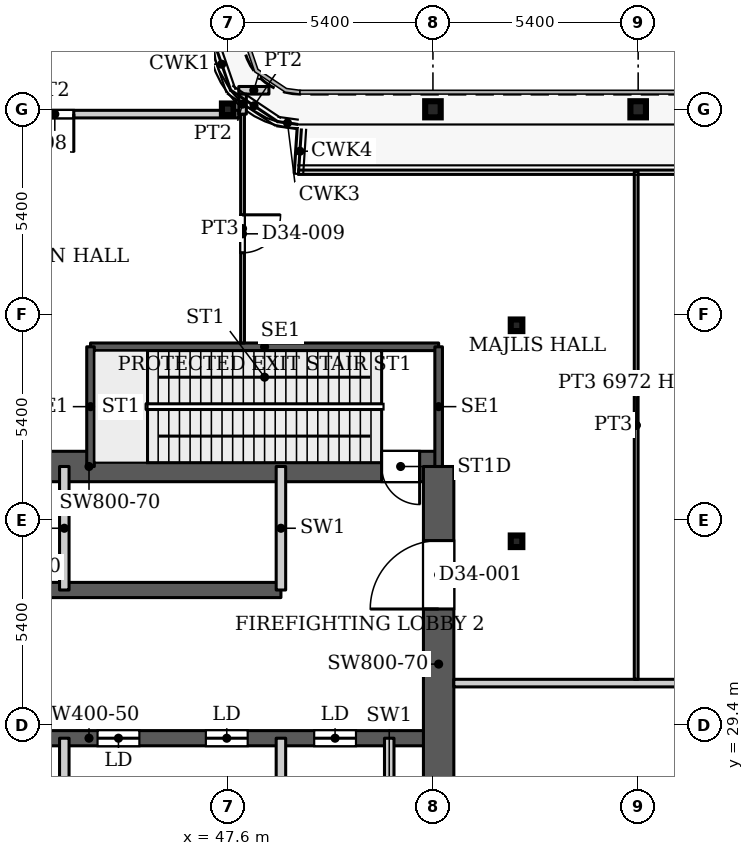
"""IFC4 building model, lengths in metres.
Left out: names, types, materials, properties, quantities, classifications, styles, units other than length and angle.
Written with IfcOpenShell. Run it as: python <this file> out.ifc"""

import sys

from ifc_helpers import new_model, si_unit, direction, frame, frame_2d, origin, origin_2d, place, context, subcontext, project, spatial, rectangle, hollow_rectangle, i_section, extrude, source, transform, mapped, element, fill, save


model = new_model("IFC4")
c1 = context("Model", 3, precision=1e-05, world=origin(), true_north=direction((0.0, 1.0)))
c2 = subcontext(c1, "Body", "Model", "MODEL_VIEW")
j1 = project(units=[si_unit("LENGTHUNIT", "METRE"), si_unit("PLANEANGLEUNIT", "RADIAN")], contexts=[c1])
p1 = place(None, origin())
s1 = spatial("IfcSite", under=j1, at=p1, CompositionType="ELEMENT")
p2 = place(p1, origin())
s2 = spatial("IfcBuilding", under=s1, at=p2, CompositionType="ELEMENT")
p3 = place(p2, frame((0.0, 0.0, 144.8)))
s3 = spatial("IfcBuildingStorey", under=s2, at=p3, CompositionType="ELEMENT", Elevation=144.8)
for number, where, z_axis, x_axis in (
    (1, (53.0, 45.6, 0.0), (0.0, 0.0, 1.0), (1.0, 0.0, 0.0)),
    (2, (58.4, 45.6, 0.0), (0.0, 0.0, 1.0), (1.0, 0.0, 0.0)),
):
    element("IfcColumn", number, at=place(p3, frame(where, z_axis=z_axis, x_axis=x_axis)), inside=s3, PredefinedType="COLUMN", context=c2, shape_type="SweptSolid", body=[
        extrude(i_section(OverallWidth=0.409, OverallDepth=0.425, WebThickness=0.033, FlangeThickness=0.052, FilletRadius=0.013, at=origin_2d()), origin(), (0.0, 0.0, 1.0), 7.8),
    ])
for number, where, z_axis, x_axis in (
    (3, (55.2, 34.232, 0.0), (0.0, 0.0, 1.0), (1.0, 0.0, 0.0)),
    (4, (55.2, 39.916, 0.0), (0.0, 0.0, 1.0), (1.0, 0.0, 0.0)),
    (5, (47.6, 45.6, 0.0), (0.0, 0.0, 1.0), (1.0, 0.0, 0.0)),
):
    element("IfcColumn", number, at=place(p3, frame(where, z_axis=z_axis, x_axis=x_axis)), inside=s3, PredefinedType="COLUMN", context=c2, shape_type="SweptSolid", body=[
        extrude(hollow_rectangle(XDim=0.305, YDim=0.305, WallThickness=0.016, InnerFilletRadius=0.016, OuterFilletRadius=0.032, at=origin_2d()), origin(), (0.0, 0.0, 1.0), 7.8),
    ])
p4 = place(p3, frame((34.75, 29.05, 0.0), z_axis=(0.0, 0.0, 1.0), x_axis=(1.0, 0.0, 0.0)))
e6 = element("IfcWall", 6, at=p4, inside=s3, PredefinedType="SHEAR", context=c2, shape_type="SweptSolid", body=[
    extrude(rectangle(XDim=18.4, YDim=0.4, at=frame_2d((9.2, 0.0))), origin(), (0.0, 0.0, 1.0), 7.8),
])
p5 = place(p4, frame((0.875, 0.0, 0.0)))
e7 = element("IfcOpeningElement", 7, at=p5, cuts=e6, PredefinedType="OPENING", context=c2, shape_type="SweptSolid", body=[
    extrude(rectangle(XDim=1.1, YDim=2.2, at=frame_2d((0.55, 1.1))), frame((0.0, 0.21, 0.0), z_axis=(0.0, -1.0, 0.0), x_axis=(1.0, 0.0, 0.0)), (0.0, 0.0, 1.0), 0.42),
])
p6 = place(p4, frame((3.725, 0.0, 0.0)))
e8 = element("IfcOpeningElement", 8, at=p6, cuts=e6, PredefinedType="OPENING", context=c2, shape_type="SweptSolid", body=[
    extrude(rectangle(XDim=1.1, YDim=2.2, at=frame_2d((0.55, 1.1))), frame((0.0, 0.21, 0.0), z_axis=(0.0, -1.0, 0.0), x_axis=(1.0, 0.0, 0.0)), (0.0, 0.0, 1.0), 0.42),
])
p7 = place(p4, frame((6.575, 0.0, 0.0)))
e9 = element("IfcOpeningElement", 9, at=p7, cuts=e6, PredefinedType="OPENING", context=c2, shape_type="SweptSolid", body=[
    extrude(rectangle(XDim=1.1, YDim=2.2, at=frame_2d((0.55, 1.1))), frame((0.0, 0.21, 0.0), z_axis=(0.0, -1.0, 0.0), x_axis=(1.0, 0.0, 0.0)), (0.0, 0.0, 1.0), 0.42),
])
p8 = place(p4, frame((9.425, 0.0, 0.0)))
e10 = element("IfcOpeningElement", 10, at=p8, cuts=e6, PredefinedType="OPENING", context=c2, shape_type="SweptSolid", body=[
    extrude(rectangle(XDim=1.1, YDim=2.2, at=frame_2d((0.55, 1.1))), frame((0.0, 0.21, 0.0), z_axis=(0.0, -1.0, 0.0), x_axis=(1.0, 0.0, 0.0)), (0.0, 0.0, 1.0), 0.42),
])
p9 = place(p4, frame((12.275, 0.0, 0.0)))
e11 = element("IfcOpeningElement", 11, at=p9, cuts=e6, PredefinedType="OPENING", context=c2, shape_type="SweptSolid", body=[
    extrude(rectangle(XDim=1.1, YDim=2.2, at=frame_2d((0.55, 1.1))), frame((0.0, 0.21, 0.0), z_axis=(0.0, -1.0, 0.0), x_axis=(1.0, 0.0, 0.0)), (0.0, 0.0, 1.0), 0.42),
])
p10 = place(p4, frame((15.125, 0.0, 0.0)))
e12 = element("IfcOpeningElement", 12, at=p10, cuts=e6, PredefinedType="OPENING", context=c2, shape_type="SweptSolid", body=[
    extrude(rectangle(XDim=1.1, YDim=2.2, at=frame_2d((0.55, 1.1))), frame((0.0, 0.21, 0.0), z_axis=(0.0, -1.0, 0.0), x_axis=(1.0, 0.0, 0.0)), (0.0, 0.0, 1.0), 0.42),
])
p11 = place(p3, frame((34.75, 32.95, 0.0), z_axis=(0.0, 0.0, 1.0), x_axis=(1.0, 0.0, 0.0)))
e13 = element("IfcWall", 13, at=p11, inside=s3, PredefinedType="SHEAR", context=c2, shape_type="SweptSolid", body=[
    extrude(rectangle(XDim=14.25, YDim=0.4, at=frame_2d((7.125, 0.0))), origin(), (0.0, 0.0, 1.0), 7.8),
])
p12 = place(p3, frame((34.75, 36.2, 0.0), z_axis=(0.0, 0.0, 1.0), x_axis=(1.0, 0.0, 0.0)))
e14 = element("IfcWall", 14, at=p12, inside=s3, PredefinedType="SHEAR", context=c2, shape_type="SweptSolid", body=[
    extrude(rectangle(XDim=18.4, YDim=0.8, at=frame_2d((9.2, 0.0))), origin(), (0.0, 0.0, 1.0), 7.8),
])
p13 = place(p12, frame((16.9, 0.0, 0.0)))
e15 = element("IfcOpeningElement", 15, at=p13, cuts=e14, PredefinedType="OPENING", context=c2, shape_type="SweptSolid", body=[
    extrude(rectangle(XDim=1.0, YDim=2.2, at=frame_2d((0.5, 1.1))), frame((0.0, 0.41, 0.0), z_axis=(0.0, -1.0, 0.0), x_axis=(1.0, 0.0, 0.0)), (0.0, 0.0, 1.0), 0.82),
])
p14 = place(p3, frame((53.15, 25.8, 0.0), z_axis=(0.0, 0.0, 1.0), x_axis=(0.0, 1.0, 0.0)))
e16 = element("IfcWall", 16, at=p14, inside=s3, PredefinedType="SHEAR", context=c2, shape_type="SweptSolid", body=[
    extrude(rectangle(XDim=10.4, YDim=0.8, at=frame_2d((5.2, 0.0))), origin(), (0.0, 0.0, 1.0), 7.8),
])
p15 = place(p14, frame((6.65, 0.0, 0.0)))
e17 = element("IfcOpeningElement", 17, at=p15, cuts=e16, PredefinedType="OPENING", context=c2, shape_type="SweptSolid", body=[
    extrude(rectangle(XDim=1.8, YDim=2.1, at=frame_2d((0.9, 1.05))), frame((0.0, 0.41, 0.0), z_axis=(0.0, -1.0, 0.0), x_axis=(1.0, 0.0, 0.0)), (0.0, 0.0, 1.0), 0.82),
])
p16 = place(p3, frame((43.99, 39.35, 0.0), z_axis=(0.0, 0.0, 1.0), x_axis=(1.0, 0.0, 0.0)))
e18 = element("IfcWall", 18, at=p16, inside=s3, PredefinedType="SHEAR", context=c2, shape_type="SweptSolid", body=[
    extrude(rectangle(XDim=9.16, YDim=0.2, at=frame_2d((4.58, 0.0))), origin(), (0.0, 0.0, 1.0), 7.8),
])
for number, where, z_axis, x_axis in (
    (19, (43.99, 36.2, 0.0), (0.0, 0.0, 1.0), (0.0, 1.0, 0.0)),
    (20, (53.15, 36.2, 0.0), (0.0, 0.0, 1.0), (0.0, 1.0, 0.0)),
):
    element("IfcWall", number, at=place(p3, frame(where, z_axis=z_axis, x_axis=x_axis)), inside=s3, PredefinedType="SHEAR", context=c2, shape_type="SweptSolid", body=[
        extrude(rectangle(XDim=3.15, YDim=0.2, at=frame_2d((1.575, 0.0))), origin(), (0.0, 0.0, 1.0), 7.8),
    ])
for number, where, z_axis, x_axis in (
    (21, (43.3, 25.8, 0.0), (0.0, 0.0, 1.0), (0.0, 1.0, 0.0)),
    (22, (43.3, 32.95, 0.0), (0.0, 0.0, 1.0), (0.0, 1.0, 0.0)),
    (23, (49.0, 25.8, 0.0), (0.0, 0.0, 1.0), (0.0, 1.0, 0.0)),
    (24, (49.0, 32.95, 0.0), (0.0, 0.0, 1.0), (0.0, 1.0, 0.0)),
    (25, (51.85, 25.8, 0.0), (0.0, 0.0, 1.0), (0.0, 1.0, 0.0)),
):
    element("IfcWall", number, at=place(p3, frame(where, z_axis=z_axis, x_axis=x_axis)), inside=s3, PredefinedType="PARTITIONING", context=c2, shape_type="SweptSolid", body=[
        extrude(rectangle(XDim=3.25, YDim=0.25, at=frame_2d((1.625, 0.0))), origin(), (0.0, 0.0, 1.0), 7.8),
    ])
p17 = place(p3, frame((37.999, 45.473, 0.0), z_axis=(0.0, 0.0, 1.0), x_axis=(1.0, 0.0, 0.0)))
e26 = element("IfcWall", 26, at=p17, inside=s3, PredefinedType="PARTITIONING", context=c2, shape_type="SweptSolid", body=[
    extrude(rectangle(XDim=9.891, YDim=0.2, at=frame_2d((4.945, 0.0))), origin(), (0.0, 0.0, 1.0), 7.5),
])
p18 = place(p17, frame((4.551, 0.0, 0.0)))
e27 = element("IfcOpeningElement", 27, at=p18, cuts=e26, PredefinedType="OPENING", context=c2, shape_type="SweptSolid", body=[
    extrude(rectangle(XDim=1.0, YDim=2.1, at=frame_2d((0.5, 1.05))), frame((0.0, 0.11, 0.0), z_axis=(0.0, -1.0, 0.0), x_axis=(1.0, 0.0, 0.0)), (0.0, 0.0, 1.0), 0.22),
])
p19 = place(p3, frame((47.89, 46.1, 0.0), z_axis=(0.0, 0.0, 1.0), x_axis=(1.0, 0.0, 0.0)))
e28 = element("IfcWall", 28, at=p19, inside=s3, PredefinedType="PARTITIONING", context=c2, shape_type="SweptSolid", body=[
    extrude(rectangle(XDim=0.794, YDim=0.2, at=frame_2d((0.397, 0.0))), origin(), (0.0, 0.0, 1.0), 7.5),
])
p20 = place(p3, frame((47.99, 39.449, 0.0), z_axis=(0.0, 0.0, 1.0), x_axis=(0.0, 1.0, 0.0)))
e29 = element("IfcWall", 29, at=p20, inside=s3, PredefinedType="PARTITIONING", context=c2, shape_type="SweptSolid", body=[
    extrude(rectangle(XDim=6.024, YDim=0.1, at=frame_2d((3.012, 0.0))), origin(), (0.0, 0.0, 1.0), 7.5),
])
p21 = place(p20, frame((2.374, 0.0, 0.0)))
e30 = element("IfcOpeningElement", 30, at=p21, cuts=e29, PredefinedType="OPENING", context=c2, shape_type="SweptSolid", body=[
    extrude(rectangle(XDim=1.0, YDim=2.1, at=frame_2d((0.5, 1.05))), frame((0.0, 0.06, 0.0), z_axis=(0.0, -1.0, 0.0), x_axis=(1.0, 0.0, 0.0)), (0.0, 0.0, 1.0), 0.12),
])
p22 = place(p3, frame((47.99, 45.473, 0.0), z_axis=(0.0, 0.0, 1.0), x_axis=(0.0, 1.0, 0.0)))
e31 = element("IfcWall", 31, at=p22, inside=s3, PredefinedType="PARTITIONING", context=c2, shape_type="SweptSolid", body=[
    extrude(rectangle(XDim=0.527, YDim=0.2, at=frame_2d((0.264, 0.0))), origin(), (0.0, 0.0, 1.0), 7.5),
])
p23 = place(p3, frame((53.549, 30.5, 0.0), z_axis=(0.0, 0.0, 1.0), x_axis=(1.0, 0.0, 0.0)))
e32 = element("IfcWall", 32, at=p23, inside=s3, PredefinedType="PARTITIONING", context=c2, shape_type="SweptSolid", body=[
    extrude(rectangle(XDim=15.207, YDim=0.2, at=frame_2d((7.604, 0.0))), origin(), (0.0, 0.0, 1.0), 7.5),
])
p24 = place(p23, frame((9.083, 0.0, 0.0)))
e33 = element("IfcOpeningElement", 33, at=p24, cuts=e32, PredefinedType="OPENING", context=c2, shape_type="SweptSolid", body=[
    extrude(rectangle(XDim=1.8, YDim=2.1, at=frame_2d((0.9, 1.05))), frame((0.0, 0.11, 0.0), z_axis=(0.0, -1.0, 0.0), x_axis=(1.0, 0.0, 0.0)), (0.0, 0.0, 1.0), 0.22),
])
p25 = place(p3, frame((58.348, 30.6, 0.0), z_axis=(0.0, 0.0, 1.0), x_axis=(0.0, 1.0, 0.0)))
e34 = element("IfcWall", 34, at=p25, inside=s3, PredefinedType="PARTITIONING", context=c2, shape_type="SweptSolid", body=[
    extrude(rectangle(XDim=13.37, YDim=0.1, at=frame_2d((6.685, 0.0))), origin(), (0.0, 0.0, 1.0), 6.972),
])
m1 = source(origin(), c2, "Body", "SweptSolid", [
    extrude(rectangle(XDim=1.1, YDim=2.2, at=frame_2d((0.55, 1.1))), frame((0.0, 0.025, 0.0), z_axis=(0.0, -1.0, 0.0), x_axis=(1.0, 0.0, 0.0)), (0.0, 0.0, 1.0), 0.05),
])
p26 = place(p8, origin())
e35 = element("IfcDoor", 35, at=p26, inside=s3, OperationType="SLIDING_TO_LEFT", PredefinedType="DOOR", context=c2, shape_type="MappedRepresentation", body=[
    mapped(m1, transform((0.0, 0.0, 0.0), x_axis=(1.0, 0.0, 0.0), y_axis=(0.0, 1.0, 0.0), z_axis=(0.0, 0.0, 1.0), scale=1.0)),
])
fill(e10, e35)
p27 = place(p9, origin())
e36 = element("IfcDoor", 36, at=p27, inside=s3, OperationType="SLIDING_TO_LEFT", PredefinedType="DOOR", context=c2, shape_type="MappedRepresentation", body=[
    mapped(m1, transform((0.0, 0.0, 0.0), x_axis=(1.0, 0.0, 0.0), y_axis=(0.0, 1.0, 0.0), z_axis=(0.0, 0.0, 1.0), scale=1.0)),
])
fill(e11, e36)
p28 = place(p10, origin())
e37 = element("IfcDoor", 37, at=p28, inside=s3, OperationType="SLIDING_TO_LEFT", PredefinedType="DOOR", context=c2, shape_type="MappedRepresentation", body=[
    mapped(m1, transform((0.0, 0.0, 0.0), x_axis=(1.0, 0.0, 0.0), y_axis=(0.0, 1.0, 0.0), z_axis=(0.0, 0.0, 1.0), scale=1.0)),
])
fill(e12, e37)
m2 = source(origin(), c2, "Body", "SweptSolid", [
    extrude(rectangle(XDim=1.0, YDim=2.2, at=frame_2d((0.5, 1.1))), frame((0.0, 0.025, 0.0), z_axis=(0.0, -1.0, 0.0), x_axis=(1.0, 0.0, 0.0)), (0.0, 0.0, 1.0), 0.05),
])
p29 = place(p13, origin())
e38 = element("IfcDoor", 38, at=p29, inside=s3, OperationType="SINGLE_SWING_RIGHT", PredefinedType="DOOR", context=c2, shape_type="MappedRepresentation", body=[
    mapped(m2, transform((0.0, 0.0, 0.0), x_axis=(1.0, 0.0, 0.0), y_axis=(0.0, 1.0, 0.0), z_axis=(0.0, 0.0, 1.0), scale=1.0)),
])
fill(e15, e38)
m3 = source(origin(), c2, "Body", "SweptSolid", [
    extrude(rectangle(XDim=1.8, YDim=2.1, at=frame_2d((0.9, 1.05))), frame((0.0, 0.025, 0.0), z_axis=(0.0, -1.0, 0.0), x_axis=(1.0, 0.0, 0.0)), (0.0, 0.0, 1.0), 0.05),
])
p30 = place(p15, origin())
e39 = element("IfcDoor", 39, at=p30, inside=s3, OperationType="DOUBLE_DOOR_SINGLE_SWING", PredefinedType="DOOR", context=c2, shape_type="MappedRepresentation", body=[
    mapped(m3, transform((0.0, 0.0, 0.0), x_axis=(1.0, 0.0, 0.0), y_axis=(0.0, 1.0, 0.0), z_axis=(0.0, 0.0, 1.0), scale=1.0)),
])
fill(e17, e39)
m4 = source(origin(), c2, "Body", "SweptSolid", [
    extrude(rectangle(XDim=1.0, YDim=2.1, at=frame_2d((0.5, 1.05))), frame((0.0, 0.025, 0.0), z_axis=(0.0, -1.0, 0.0), x_axis=(1.0, 0.0, 0.0)), (0.0, 0.0, 1.0), 0.05),
])
p31 = place(p18, origin())
e40 = element("IfcDoor", 40, at=p31, inside=s3, OperationType="SINGLE_SWING_RIGHT", PredefinedType="DOOR", context=c2, shape_type="MappedRepresentation", body=[
    mapped(m4, transform((0.0, 0.0, 0.0), x_axis=(1.0, 0.0, 0.0), y_axis=(0.0, 1.0, 0.0), z_axis=(0.0, 0.0, 1.0), scale=1.0)),
])
fill(e27, e40)
m5 = source(origin(), c2, "Body", "SweptSolid", [
    extrude(rectangle(XDim=1.0, YDim=2.1, at=frame_2d((0.5, 1.05))), frame((0.0, 0.025, 0.0), z_axis=(0.0, -1.0, 0.0), x_axis=(1.0, 0.0, 0.0)), (0.0, 0.0, 1.0), 0.05),
])
p32 = place(p21, origin())
e41 = element("IfcDoor", 41, at=p32, inside=s3, OperationType="SINGLE_SWING_RIGHT", PredefinedType="DOOR", context=c2, shape_type="MappedRepresentation", body=[
    mapped(m5, transform((0.0, 0.0, 0.0), x_axis=(1.0, 0.0, 0.0), y_axis=(0.0, 1.0, 0.0), z_axis=(0.0, 0.0, 1.0), scale=1.0)),
])
fill(e30, e41)
save(model, sys.argv[1])
